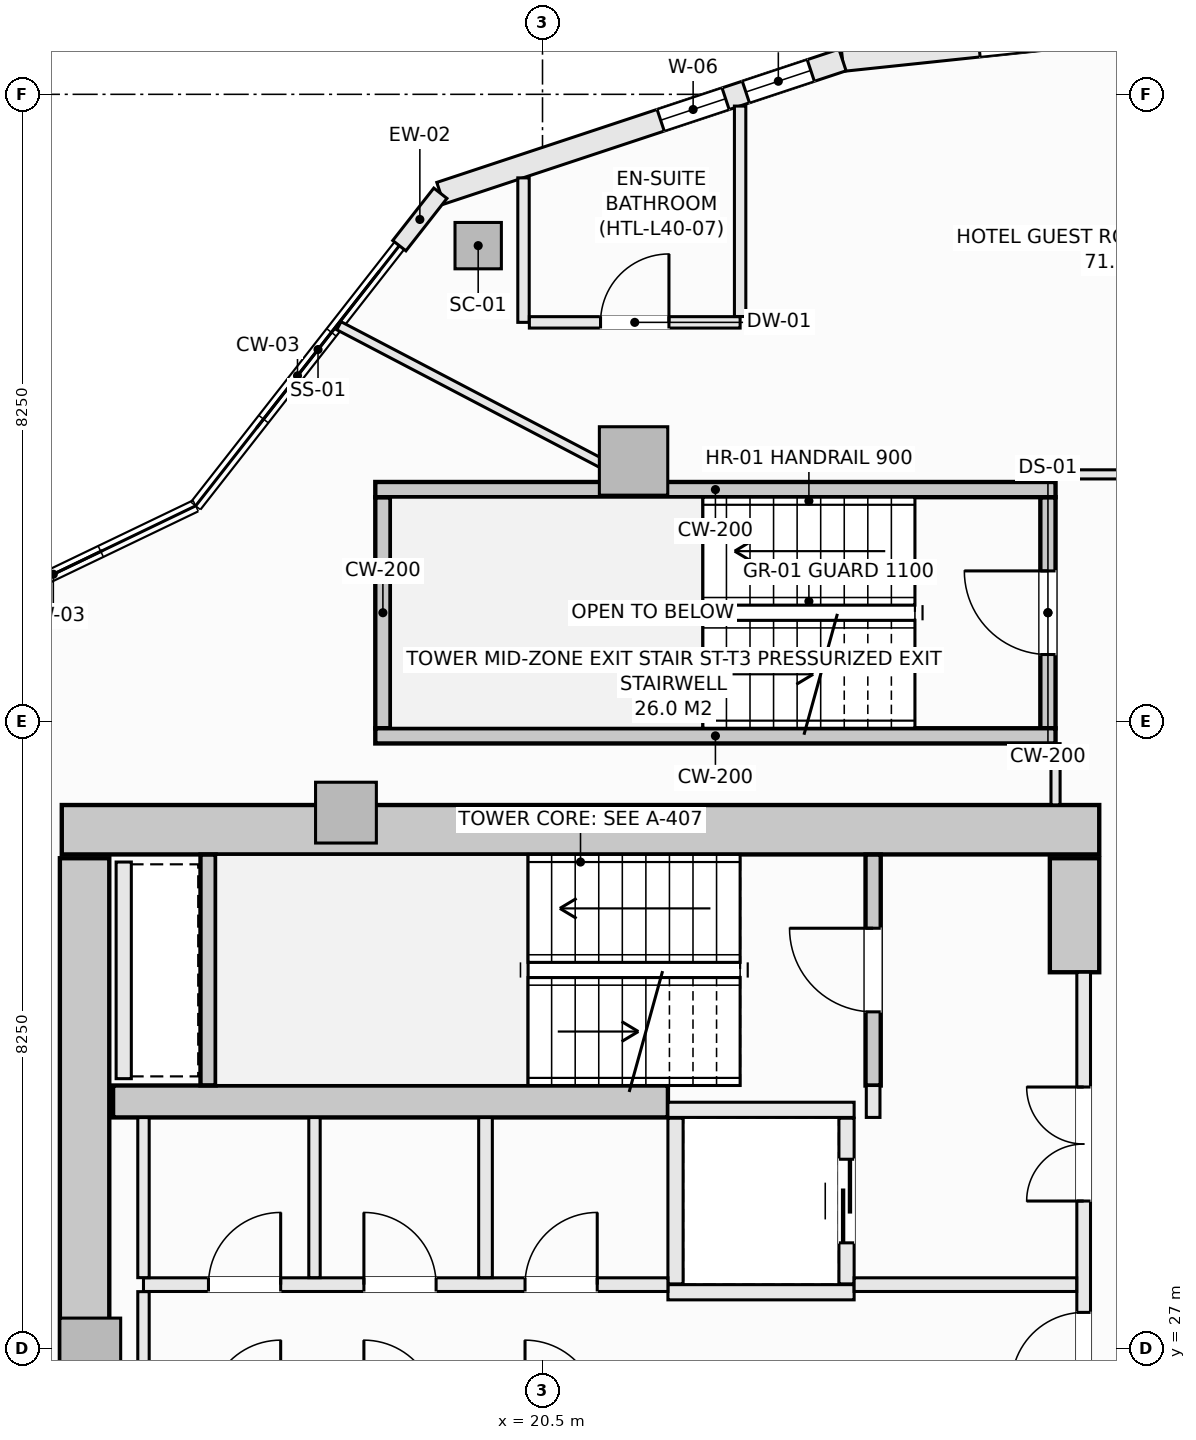
"""IFC4 building model, lengths in metres.
Left out: names, types, materials, properties, quantities, classifications, styles, units other than length and angle.
Written with IfcOpenShell. Run it as: python <this file> out.ifc"""

import sys

from ifc_helpers import new_model, si_unit, direction, frame, frame_2d, origin, origin_2d, place, context, subcontext, project, spatial, rectangle, hollow_rectangle, extrude, element, fill, save


model = new_model("IFC4")
c1 = context("Model", 3, precision=1e-05, world=origin(), true_north=direction((0.0, 1.0)))
c2 = subcontext(c1, "Body", "Model", "MODEL_VIEW")
j1 = project(units=[si_unit("LENGTHUNIT", "METRE"), si_unit("PLANEANGLEUNIT", "RADIAN")], contexts=[c1])
p1 = place(None, origin())
s1 = spatial("IfcSite", under=j1, at=p1, CompositionType="ELEMENT")
p2 = place(p1, origin())
s2 = spatial("IfcBuilding", under=s1, at=p2, CompositionType="ELEMENT")
p3 = place(p2, frame((0.0, 0.0, 156.3)))
s3 = spatial("IfcBuildingStorey", under=s2, at=p3, CompositionType="ELEMENT", Elevation=156.3)
p4 = place(p3, frame((14.175, 33.825, -0.27), z_axis=(0.0, 0.0, 1.0), x_axis=(1.0, 0.0, 0.0)))
e1 = element("IfcWall", 1, at=p4, inside=s3, PredefinedType="SHEAR", context=c2, shape_type="SweptSolid", body=[
    extrude(rectangle(XDim=13.65, YDim=0.65, at=frame_2d((6.825, 0.0))), origin(), (0.0, 0.0, 1.0), 3.4),
])
p5 = place(p3, frame((14.475, 20.55, -0.27), z_axis=(0.0, 0.0, 1.0), x_axis=(0.0, 1.0, 0.0)))
e2 = element("IfcWall", 2, at=p5, inside=s3, PredefinedType="SHEAR", context=c2, shape_type="SweptSolid", body=[
    extrude(rectangle(XDim=12.9, YDim=0.65, at=frame_2d((6.45, 0.0))), origin(), (0.0, 0.0, 1.0), 3.4),
])
p6 = place(p3, frame((27.5, 31.95, -0.27), z_axis=(0.0, 0.0, 1.0), x_axis=(0.0, 1.0, 0.0)))
e3 = element("IfcWall", 3, at=p6, inside=s3, PredefinedType="SHEAR", context=c2, shape_type="SweptSolid", body=[
    extrude(rectangle(XDim=1.5, YDim=0.65, at=frame_2d((0.75, 0.0))), origin(), (0.0, 0.0, 1.0), 3.4),
])
p7 = place(p3, frame((14.85, 30.25, -0.27), z_axis=(0.0, 0.0, 1.0), x_axis=(1.0, 0.0, 0.0)))
e4 = element("IfcWall", 4, at=p7, inside=s3, PredefinedType="SHEAR", context=c2, shape_type="SweptSolid", body=[
    extrude(rectangle(XDim=7.3, YDim=0.42, at=frame_2d((3.65, 0.0))), origin(), (0.0, 0.0, 1.0), 3.4),
])
p8 = place(p3, frame((19.654, 41.51, -0.27), z_axis=(0.0, 0.0, 1.0), x_axis=(1.0, 0.0, 0.0)))
e5 = element("IfcColumn", 5, at=p8, inside=s3, PredefinedType="COLUMN", context=c2, shape_type="SweptSolid", body=[
    extrude(hollow_rectangle(XDim=0.61, YDim=0.61, WallThickness=0.025, at=origin_2d()), origin(), (0.0, 0.0, 1.0), 3.4),
])
p9 = place(p3, frame((21.698, 38.677, -0.27), z_axis=(0.0, 0.0, 1.0), x_axis=(1.0, 0.0, 0.0)))
e6 = element("IfcColumn", 6, at=p9, inside=s3, PredefinedType="COLUMN", context=c2, shape_type="SweptSolid", body=[
    extrude(rectangle(XDim=0.9, YDim=0.9, at=origin_2d()), origin(), (0.0, 0.0, 1.0), 3.4),
])
for number, where, z_axis, x_axis in (
    (7, (17.914, 34.05, -0.27), (0.0, 0.0, 1.0), (1.0, 0.0, 0.0)),
    (8, (14.55, 27.0, -0.27), (0.0, 0.0, 1.0), (1.0, 0.0, 0.0)),
):
    element("IfcColumn", number, at=place(p3, frame(where, z_axis=z_axis, x_axis=x_axis)), inside=s3, PredefinedType="PILASTER", context=c2, shape_type="SweptSolid", body=[
        extrude(rectangle(XDim=0.8, YDim=0.8, at=origin_2d()), origin(), (0.0, 0.0, 1.0), 3.4),
    ])
p10 = place(p3, frame((24.447, 43.952, 0.0), z_axis=(0.0, 0.0, 1.0), x_axis=(0.994496545245, 0.104769372887, 0.0)))
e9 = element("IfcWall", 9, at=p10, inside=s3, PredefinedType="SOLIDWALL", context=c2, shape_type="SweptSolid", body=[
    extrude(rectangle(XDim=5.709, YDim=0.3, at=frame_2d((2.854, 0.0))), origin(), (0.0, 0.0, 1.0), 2.653),
])
p11 = place(p10, frame((1.805, 0.0, 0.74)))
e10 = element("IfcOpeningElement", 10, at=p11, cuts=e9, PredefinedType="OPENING", context=c2, shape_type="SweptSolid", body=[
    extrude(rectangle(XDim=2.1, YDim=1.7, at=frame_2d((1.05, 0.85))), frame((0.0, 0.16, 0.0), z_axis=(0.0, -1.0, 0.0), x_axis=(1.0, 0.0, 0.0)), (0.0, 0.0, 1.0), 0.32),
])
p12 = place(p3, frame((19.156, 42.199, 0.0), z_axis=(0.0, 0.0, 1.0), x_axis=(0.949246811547, 0.314532177636, 0.0)))
e11 = element("IfcWall", 11, at=p12, inside=s3, PredefinedType="SOLIDWALL", context=c2, shape_type="SweptSolid", body=[
    extrude(rectangle(XDim=5.574, YDim=0.3, at=frame_2d((2.787, 0.0))), origin(), (0.0, 0.0, 1.0), 2.653),
])
p13 = place(p12, frame((3.053, 0.0, 0.74)))
e12 = element("IfcOpeningElement", 12, at=p13, cuts=e11, PredefinedType="OPENING", context=c2, shape_type="SweptSolid", body=[
    extrude(rectangle(XDim=0.9, YDim=1.7, at=frame_2d((0.45, 0.85))), frame((0.0, 0.16, 0.0), z_axis=(0.0, -1.0, 0.0), x_axis=(1.0, 0.0, 0.0)), (0.0, 0.0, 1.0), 0.32),
])
p14 = place(p12, frame((4.234, 0.0, 0.74)))
e13 = element("IfcOpeningElement", 13, at=p14, cuts=e11, PredefinedType="OPENING", context=c2, shape_type="SweptSolid", body=[
    extrude(rectangle(XDim=0.9, YDim=1.7, at=frame_2d((0.45, 0.85))), frame((0.0, 0.16, 0.0), z_axis=(0.0, -1.0, 0.0), x_axis=(1.0, 0.0, 0.0)), (0.0, 0.0, 1.0), 0.32),
])
p15 = place(p3, frame((18.616, 41.509, 0.0), z_axis=(0.0, 0.0, 1.0), x_axis=(0.616368366719, 0.787457958566, 0.0)))
e14 = element("IfcWall", 14, at=p15, inside=s3, PredefinedType="SOLIDWALL", context=c2, shape_type="SweptSolid", body=[
    extrude(rectangle(XDim=0.876, YDim=0.22, at=frame_2d((0.438, 0.0))), origin(), (0.0, 0.0, 1.0), 2.653),
])
p16 = place(p3, frame((24.85, 30.46, -0.27), z_axis=(0.0, 0.0, 1.0), x_axis=(0.0, 1.0, 0.0)))
e15 = element("IfcWall", 15, at=p16, inside=s3, PredefinedType="SHEAR", context=c2, shape_type="SweptSolid", body=[
    extrude(rectangle(XDim=3.038, YDim=0.2, at=frame_2d((1.519, 0.0))), origin(), (0.0, 0.0, 1.0), 3.4),
])
p17 = place(p16, frame((0.969, 0.0, 0.27)))
e16 = element("IfcOpeningElement", 16, at=p17, cuts=e15, PredefinedType="OPENING", context=c2, shape_type="SweptSolid", body=[
    extrude(rectangle(XDim=1.1, YDim=2.15, at=frame_2d((0.55, 1.075))), frame((0.0, 0.11, 0.0), z_axis=(0.0, -1.0, 0.0), x_axis=(1.0, 0.0, 0.0)), (0.0, 0.0, 1.0), 0.22),
])
p18 = place(p3, frame((16.1, 30.462, -0.27), z_axis=(0.0, 0.0, 1.0), x_axis=(0.0, 1.0, 0.0)))
e17 = element("IfcWall", 17, at=p18, inside=s3, PredefinedType="SHEAR", context=c2, shape_type="SweptSolid", body=[
    extrude(rectangle(XDim=3.036, YDim=0.2, at=frame_2d((1.518, 0.0))), origin(), (0.0, 0.0, 1.0), 3.4),
])
p19 = place(p3, frame((27.15, 35.16, -0.27), z_axis=(0.0, 0.0, 1.0), x_axis=(0.0, 1.0, 0.0)))
e18 = element("IfcWall", 18, at=p19, inside=s3, PredefinedType="SHEAR", context=c2, shape_type="SweptSolid", body=[
    extrude(rectangle(XDim=3.04, YDim=0.2, at=frame_2d((1.52, 0.0))), origin(), (0.0, 0.0, 1.0), 3.4),
])
p20 = place(p19, frame((0.97, 0.0, 0.27)))
e19 = element("IfcOpeningElement", 19, at=p20, cuts=e18, PredefinedType="OPENING", context=c2, shape_type="SweptSolid", body=[
    extrude(rectangle(XDim=1.1, YDim=2.15, at=frame_2d((0.55, 1.075))), frame((0.0, 0.11, 0.0), z_axis=(0.0, -1.0, 0.0), x_axis=(1.0, 0.0, 0.0)), (0.0, 0.0, 1.0), 0.22),
])
p21 = place(p3, frame((18.4, 35.16, -0.27), z_axis=(0.0, 0.0, 1.0), x_axis=(0.0, 1.0, 0.0)))
e20 = element("IfcWall", 20, at=p21, inside=s3, PredefinedType="SHEAR", context=c2, shape_type="SweptSolid", body=[
    extrude(rectangle(XDim=3.04, YDim=0.2, at=frame_2d((1.52, 0.0))), origin(), (0.0, 0.0, 1.0), 3.4),
])
for number, where, z_axis, x_axis in (
    (21, (18.3, 38.3, -0.27), (0.0, 0.0, 1.0), (1.0, 0.0, 0.0)),
    (22, (18.3, 35.06, -0.27), (0.0, 0.0, 1.0), (1.0, 0.0, 0.0)),
):
    element("IfcWall", number, at=place(p3, frame(where, z_axis=z_axis, x_axis=x_axis)), inside=s3, PredefinedType="SHEAR", context=c2, shape_type="SweptSolid", body=[
        extrude(rectangle(XDim=8.95, YDim=0.2, at=frame_2d((4.475, 0.0))), origin(), (0.0, 0.0, 1.0), 3.4),
    ])
for number, where, z_axis, x_axis in (
    (23, (22.15, 30.14, 0.0), (0.0, 0.0, 1.0), (1.0, 0.0, 0.0)),
    (24, (22.15, 27.74, 0.0), (0.0, 0.0, 1.0), (1.0, 0.0, 0.0)),
):
    element("IfcWall", number, at=place(p3, frame(where, z_axis=z_axis, x_axis=x_axis)), inside=s3, PredefinedType="SOLIDWALL", context=c2, shape_type="SweptSolid", body=[
        extrude(rectangle(XDim=2.45, YDim=0.2, at=frame_2d((1.225, 0.0))), origin(), (0.0, 0.0, 1.0), 3.13),
    ])
p22 = place(p3, frame((22.25, 27.85, 0.0), z_axis=(0.0, 0.0, 1.0), x_axis=(0.0, 1.0, 0.0)))
e25 = element("IfcWall", 25, at=p22, inside=s3, PredefinedType="SOLIDWALL", context=c2, shape_type="SweptSolid", body=[
    extrude(rectangle(XDim=2.18, YDim=0.2, at=frame_2d((1.09, 0.0))), origin(), (0.0, 0.0, 1.0), 3.13),
])
p23 = place(p3, frame((24.5, 27.85, 0.0), z_axis=(0.0, 0.0, 1.0), x_axis=(0.0, 1.0, 0.0)))
e26 = element("IfcWall", 26, at=p23, inside=s3, PredefinedType="SOLIDWALL", context=c2, shape_type="SweptSolid", body=[
    extrude(rectangle(XDim=2.18, YDim=0.2, at=frame_2d((1.09, 0.0))), origin(), (0.0, 0.0, 1.0), 3.13),
])
p24 = place(p23, frame((0.54, 0.0, 0.0)))
e27 = element("IfcOpeningElement", 27, at=p24, cuts=e26, PredefinedType="OPENING", context=c2, shape_type="SweptSolid", body=[
    extrude(rectangle(XDim=1.1, YDim=2.2, at=frame_2d((0.55, 1.1))), frame((0.0, 0.11, 0.0), z_axis=(0.0, -1.0, 0.0), x_axis=(1.0, 0.0, 0.0)), (0.0, 0.0, 1.0), 0.22),
])
p25 = place(p3, frame((14.99, 30.55, 0.0), z_axis=(0.0, 0.0, 1.0), x_axis=(0.0, 1.0, 0.0)))
e28 = element("IfcWall", 28, at=p25, inside=s3, PredefinedType="SOLIDWALL", context=c2, shape_type="SweptSolid", body=[
    extrude(rectangle(XDim=2.85, YDim=0.2, at=frame_2d((1.425, 0.0))), origin(), (0.0, 0.0, 1.0), 3.13),
])
p26 = place(p3, frame((24.85, 30.04, 0.0), z_axis=(0.0, 0.0, 1.0), x_axis=(0.0, 1.0, 0.0)))
e29 = element("IfcWall", 29, at=p26, inside=s3, PredefinedType="SOLIDWALL", context=c2, shape_type="SweptSolid", body=[
    extrude(rectangle(XDim=0.42, YDim=0.18, at=frame_2d((0.21, 0.0))), origin(), (0.0, 0.0, 1.0), 3.13),
])
p27 = place(p3, frame((27.62, 22.05, 0.0), z_axis=(0.0, 0.0, 1.0), x_axis=(0.0, 1.0, 0.0)))
e30 = element("IfcWall", 30, at=p27, inside=s3, PredefinedType="SOLIDWALL", context=c2, shape_type="SweptSolid", body=[
    extrude(rectangle(XDim=9.9, YDim=0.18, at=frame_2d((4.95, 0.0))), origin(), (0.0, 0.0, 1.0), 3.13),
])
p28 = place(p27, frame((4.475, 0.0, 0.0)))
e31 = element("IfcOpeningElement", 31, at=p28, cuts=e30, PredefinedType="OPENING", context=c2, shape_type="SweptSolid", body=[
    extrude(rectangle(XDim=0.95, YDim=2.1, at=frame_2d((0.475, 1.05))), frame((0.0, 0.1, 0.0), z_axis=(0.0, -1.0, 0.0), x_axis=(1.0, 0.0, 0.0)), (0.0, 0.0, 1.0), 0.2),
])
p29 = place(p27, frame((6.89, 0.0, 0.0)))
e32 = element("IfcOpeningElement", 32, at=p29, cuts=e30, PredefinedType="OPENING", context=c2, shape_type="SweptSolid", body=[
    extrude(rectangle(XDim=1.5, YDim=2.2, at=frame_2d((0.75, 1.1))), frame((0.0, 0.1, 0.0), z_axis=(0.0, -1.0, 0.0), x_axis=(1.0, 0.0, 0.0)), (0.0, 0.0, 1.0), 0.2),
])
p30 = place(p27, frame((1.51, 0.0, 0.0)))
e33 = element("IfcOpeningElement", 33, at=p30, cuts=e30, PredefinedType="OPENING", context=c2, shape_type="SweptSolid", body=[
    extrude(rectangle(XDim=1.5, YDim=2.2, at=frame_2d((0.75, 1.1))), frame((0.0, 0.1, 0.0), z_axis=(0.0, -1.0, 0.0), x_axis=(1.0, 0.0, 0.0)), (0.0, 0.0, 1.0), 0.2),
])
p31 = place(p3, frame((15.25, 27.84, 0.0), z_axis=(0.0, 0.0, 1.0), x_axis=(1.0, 0.0, 0.0)))
e34 = element("IfcWall", 34, at=p31, inside=s3, PredefinedType="SOLIDWALL", context=c2, shape_type="SweptSolid", body=[
    extrude(rectangle(XDim=6.9, YDim=0.18, at=frame_2d((3.45, 0.0))), origin(), (0.0, 0.0, 1.0), 3.13),
])
p32 = place(p31, frame((5.02, 0.0, 0.0)))
e35 = element("IfcOpeningElement", 35, at=p32, cuts=e34, PredefinedType="OPENING", context=c2, shape_type="SweptSolid", body=[
    extrude(rectangle(XDim=0.95, YDim=2.1, at=frame_2d((0.475, 1.05))), frame((0.0, 0.1, 0.0), z_axis=(0.0, -1.0, 0.0), x_axis=(1.0, 0.0, 0.0)), (0.0, 0.0, 1.0), 0.2),
])
p33 = place(p31, frame((0.855, 0.0, 0.0)))
e36 = element("IfcOpeningElement", 36, at=p33, cuts=e34, PredefinedType="OPENING", context=c2, shape_type="SweptSolid", body=[
    extrude(rectangle(XDim=0.95, YDim=2.1, at=frame_2d((0.475, 1.05))), frame((0.0, 0.1, 0.0), z_axis=(0.0, -1.0, 0.0), x_axis=(1.0, 0.0, 0.0)), (0.0, 0.0, 1.0), 0.2),
])
p34 = place(p31, frame((2.9, 0.0, 0.0)))
e37 = element("IfcOpeningElement", 37, at=p34, cuts=e34, PredefinedType="OPENING", context=c2, shape_type="SweptSolid", body=[
    extrude(rectangle(XDim=0.95, YDim=2.1, at=frame_2d((0.475, 1.05))), frame((0.0, 0.1, 0.0), z_axis=(0.0, -1.0, 0.0), x_axis=(1.0, 0.0, 0.0)), (0.0, 0.0, 1.0), 0.2),
])
p35 = place(p3, frame((24.6, 27.84, 0.0), z_axis=(0.0, 0.0, 1.0), x_axis=(1.0, 0.0, 0.0)))
e38 = element("IfcWall", 38, at=p35, inside=s3, PredefinedType="SOLIDWALL", context=c2, shape_type="SweptSolid", body=[
    extrude(rectangle(XDim=2.928, YDim=0.18, at=frame_2d((1.464, 0.0))), origin(), (0.0, 0.0, 1.0), 3.13),
])
p36 = place(p3, frame((15.25, 26.252, 0.0), z_axis=(0.0, 0.0, 1.0), x_axis=(0.0, 1.0, 0.0)))
e39 = element("IfcWall", 39, at=p36, inside=s3, PredefinedType="PARTITIONING", context=c2, shape_type="SweptSolid", body=[
    extrude(rectangle(XDim=1.496, YDim=0.15, at=frame_2d((0.748, 0.0))), origin(), (0.0, 0.0, 1.0), 3.13),
])
p37 = place(p3, frame((15.25, 27.932, 0.0), z_axis=(0.0, 0.0, 1.0), x_axis=(0.0, 1.0, 0.0)))
e40 = element("IfcWall", 40, at=p37, inside=s3, PredefinedType="PARTITIONING", context=c2, shape_type="SweptSolid", body=[
    extrude(rectangle(XDim=2.106, YDim=0.15, at=frame_2d((1.053, 0.0))), origin(), (0.0, 0.0, 1.0), 3.13),
])
p38 = place(p3, frame((19.75, 27.932, 0.0), z_axis=(0.0, 0.0, 1.0), x_axis=(0.0, 1.0, 0.0)))
e41 = element("IfcWall", 41, at=p38, inside=s3, PredefinedType="SOLIDWALL", context=c2, shape_type="SweptSolid", body=[
    extrude(rectangle(XDim=2.106, YDim=0.18, at=frame_2d((1.053, 0.0))), origin(), (0.0, 0.0, 1.0), 3.13),
])
p39 = place(p3, frame((17.5, 27.932, 0.0), z_axis=(0.0, 0.0, 1.0), x_axis=(0.0, 1.0, 0.0)))
e42 = element("IfcWall", 42, at=p39, inside=s3, PredefinedType="PARTITIONING", context=c2, shape_type="SweptSolid", body=[
    extrude(rectangle(XDim=2.106, YDim=0.15, at=frame_2d((1.053, 0.0))), origin(), (0.0, 0.0, 1.0), 3.13),
])
p40 = place(p3, frame((27.25, 34.152, 0.0), z_axis=(0.0, 0.0, 1.0), x_axis=(0.0, 1.0, 0.0)))
e43 = element("IfcWall", 43, at=p40, inside=s3, PredefinedType="PARTITIONING", context=c2, shape_type="SweptSolid", body=[
    extrude(rectangle(XDim=0.806, YDim=0.12, at=frame_2d((0.403, 0.0))), origin(), (0.0, 0.0, 1.0), 3.13),
])
p41 = place(p3, frame((27.25, 38.5, 0.0), z_axis=(0.0, 0.0, 1.0), x_axis=(1.0, 0.0, 0.0)))
e44 = element("IfcWall", 44, at=p41, inside=s3, PredefinedType="PARTITIONING", context=c2, shape_type="SweptSolid", body=[
    extrude(rectangle(XDim=2.53, YDim=0.12, at=frame_2d((1.265, 0.0))), origin(), (0.0, 0.0, 1.0), 3.13),
])
p42 = place(p3, frame((17.821, 40.456, 0.0), z_axis=(0.0, 0.0, 1.0), x_axis=(0.885899524476, -0.463877173974, 0.0)))
e45 = element("IfcWall", 45, at=p42, inside=s3, PredefinedType="PARTITIONING", context=c2, shape_type="SweptSolid", body=[
    extrude(rectangle(XDim=4.427, YDim=0.12, at=frame_2d((2.214, 0.0))), origin(), (0.0, 0.0, 1.0), 3.13),
])
p43 = place(p3, frame((20.25, 40.5, 0.0), z_axis=(0.0, 0.0, 1.0), x_axis=(0.0, 1.0, 0.0)))
e46 = element("IfcWall", 46, at=p43, inside=s3, PredefinedType="PARTITIONING", context=c2, shape_type="SweptSolid", body=[
    extrude(rectangle(XDim=1.901, YDim=0.15, at=frame_2d((0.95, 0.0))), origin(), (0.0, 0.0, 1.0), 2.505),
])
p44 = place(p3, frame((20.327, 40.5, 0.0), z_axis=(0.0, 0.0, 1.0), x_axis=(1.0, 0.0, 0.0)))
e47 = element("IfcWall", 47, at=p44, inside=s3, PredefinedType="PARTITIONING", context=c2, shape_type="SweptSolid", body=[
    extrude(rectangle(XDim=2.773, YDim=0.15, at=frame_2d((1.387, 0.0))), origin(), (0.0, 0.0, 1.0), 3.13),
])
p45 = place(p44, frame((0.937, 0.0, 0.0)))
e48 = element("IfcOpeningElement", 48, at=p45, cuts=e47, PredefinedType="OPENING", context=c2, shape_type="SweptSolid", body=[
    extrude(rectangle(XDim=0.9, YDim=2.1, at=frame_2d((0.45, 1.05))), frame((0.0, 0.085, 0.0), z_axis=(0.0, -1.0, 0.0), x_axis=(1.0, 0.0, 0.0)), (0.0, 0.0, 1.0), 0.17),
])
p46 = place(p3, frame((23.1, 40.577, 0.0), z_axis=(0.0, 0.0, 1.0), x_axis=(0.0, 1.0, 0.0)))
e49 = element("IfcWall", 49, at=p46, inside=s3, PredefinedType="PARTITIONING", context=c2, shape_type="SweptSolid", body=[
    extrude(rectangle(XDim=2.769, YDim=0.15, at=frame_2d((1.384, 0.0))), origin(), (0.0, 0.0, 1.0), 3.13),
])
p47 = place(p13, origin())
e50 = element("IfcWindow", 50, at=p47, inside=s3, PartitioningType="SINGLE_PANEL", PredefinedType="WINDOW", context=c2, shape_type="SweptSolid", body=[
    extrude(rectangle(XDim=0.9, YDim=1.7, at=frame_2d((0.45, 0.85))), frame((0.0, 0.03, 0.0), z_axis=(0.0, -1.0, 0.0), x_axis=(1.0, 0.0, 0.0)), (0.0, 0.0, 1.0), 0.06),
])
fill(e12, e50)
p48 = place(p17, origin())
e51 = element("IfcDoor", 51, at=p48, inside=s3, OperationType="SINGLE_SWING_RIGHT", PredefinedType="DOOR", context=c2, shape_type="SweptSolid", body=[
    extrude(rectangle(XDim=1.1, YDim=2.15, at=frame_2d((0.55, 1.075))), frame((0.0, 0.025, 0.0), z_axis=(0.0, -1.0, 0.0), x_axis=(1.0, 0.0, 0.0)), (0.0, 0.0, 1.0), 0.05),
])
fill(e16, e51)
p49 = place(p20, origin())
e52 = element("IfcDoor", 52, at=p49, inside=s3, OperationType="SINGLE_SWING_RIGHT", PredefinedType="DOOR", context=c2, shape_type="SweptSolid", body=[
    extrude(rectangle(XDim=1.1, YDim=2.15, at=frame_2d((0.55, 1.075))), frame((0.0, 0.025, 0.0), z_axis=(0.0, -1.0, 0.0), x_axis=(1.0, 0.0, 0.0)), (0.0, 0.0, 1.0), 0.05),
])
fill(e19, e52)
p50 = place(p24, origin())
e53 = element("IfcDoor", 53, at=p50, inside=s3, OperationType="SLIDING_TO_LEFT", PredefinedType="DOOR", context=c2, shape_type="SweptSolid", body=[
    extrude(rectangle(XDim=1.1, YDim=2.2, at=frame_2d((0.55, 1.1))), frame((0.0, 0.025, 0.0), z_axis=(0.0, -1.0, 0.0), x_axis=(1.0, 0.0, 0.0)), (0.0, 0.0, 1.0), 0.05),
])
fill(e27, e53)
p51 = place(p28, origin())
e54 = element("IfcDoor", 54, at=p51, inside=s3, OperationType="SINGLE_SWING_LEFT", PredefinedType="DOOR", context=c2, shape_type="SweptSolid", body=[
    extrude(rectangle(XDim=0.95, YDim=2.1, at=frame_2d((0.475, 1.05))), frame((0.0, 0.025, 0.0), z_axis=(0.0, -1.0, 0.0), x_axis=(1.0, 0.0, 0.0)), (0.0, 0.0, 1.0), 0.05),
])
fill(e31, e54)
p52 = place(p29, origin())
e55 = element("IfcDoor", 55, at=p52, inside=s3, OperationType="DOUBLE_DOOR_SINGLE_SWING", PredefinedType="DOOR", context=c2, shape_type="SweptSolid", body=[
    extrude(rectangle(XDim=1.5, YDim=2.2, at=frame_2d((0.75, 1.1))), frame((0.0, 0.025, 0.0), z_axis=(0.0, -1.0, 0.0), x_axis=(1.0, 0.0, 0.0)), (0.0, 0.0, 1.0), 0.05),
])
fill(e32, e55)
p53 = place(p32, origin())
e56 = element("IfcDoor", 56, at=p53, inside=s3, OperationType="SINGLE_SWING_RIGHT", PredefinedType="DOOR", context=c2, shape_type="SweptSolid", body=[
    extrude(rectangle(XDim=0.95, YDim=2.1, at=frame_2d((0.475, 1.05))), frame((0.0, 0.025, 0.0), z_axis=(0.0, -1.0, 0.0), x_axis=(1.0, 0.0, 0.0)), (0.0, 0.0, 1.0), 0.05),
])
fill(e35, e56)
p54 = place(p33, origin())
e57 = element("IfcDoor", 57, at=p54, inside=s3, OperationType="SINGLE_SWING_RIGHT", PredefinedType="DOOR", context=c2, shape_type="SweptSolid", body=[
    extrude(rectangle(XDim=0.95, YDim=2.1, at=frame_2d((0.475, 1.05))), frame((0.0, 0.025, 0.0), z_axis=(0.0, -1.0, 0.0), x_axis=(1.0, 0.0, 0.0)), (0.0, 0.0, 1.0), 0.05),
])
fill(e36, e57)
p55 = place(p34, origin())
e58 = element("IfcDoor", 58, at=p55, inside=s3, OperationType="SINGLE_SWING_LEFT", PredefinedType="DOOR", context=c2, shape_type="SweptSolid", body=[
    extrude(rectangle(XDim=0.95, YDim=2.1, at=frame_2d((0.475, 1.05))), frame((0.0, 0.025, 0.0), z_axis=(0.0, -1.0, 0.0), x_axis=(1.0, 0.0, 0.0)), (0.0, 0.0, 1.0), 0.05),
])
fill(e37, e58)
p56 = place(p45, origin())
e59 = element("IfcDoor", 59, at=p56, inside=s3, OperationType="SINGLE_SWING_RIGHT", PredefinedType="DOOR", context=c2, shape_type="SweptSolid", body=[
    extrude(rectangle(XDim=0.9, YDim=2.1, at=frame_2d((0.45, 1.05))), frame((0.0, 0.025, 0.0), z_axis=(0.0, -1.0, 0.0), x_axis=(1.0, 0.0, 0.0)), (0.0, 0.0, 1.0), 0.05),
])
fill(e48, e59)
p57 = place(p14, origin())
e60 = element("IfcWindow", 60, at=p57, inside=s3, PartitioningType="SINGLE_PANEL", PredefinedType="WINDOW", context=c2, shape_type="SweptSolid", body=[
    extrude(rectangle(XDim=0.9, YDim=1.7, at=frame_2d((0.45, 0.85))), frame((0.0, 0.03, 0.0), z_axis=(0.0, -1.0, 0.0), x_axis=(1.0, 0.0, 0.0)), (0.0, 0.0, 1.0), 0.06),
])
fill(e13, e60)
save(model, sys.argv[1])
